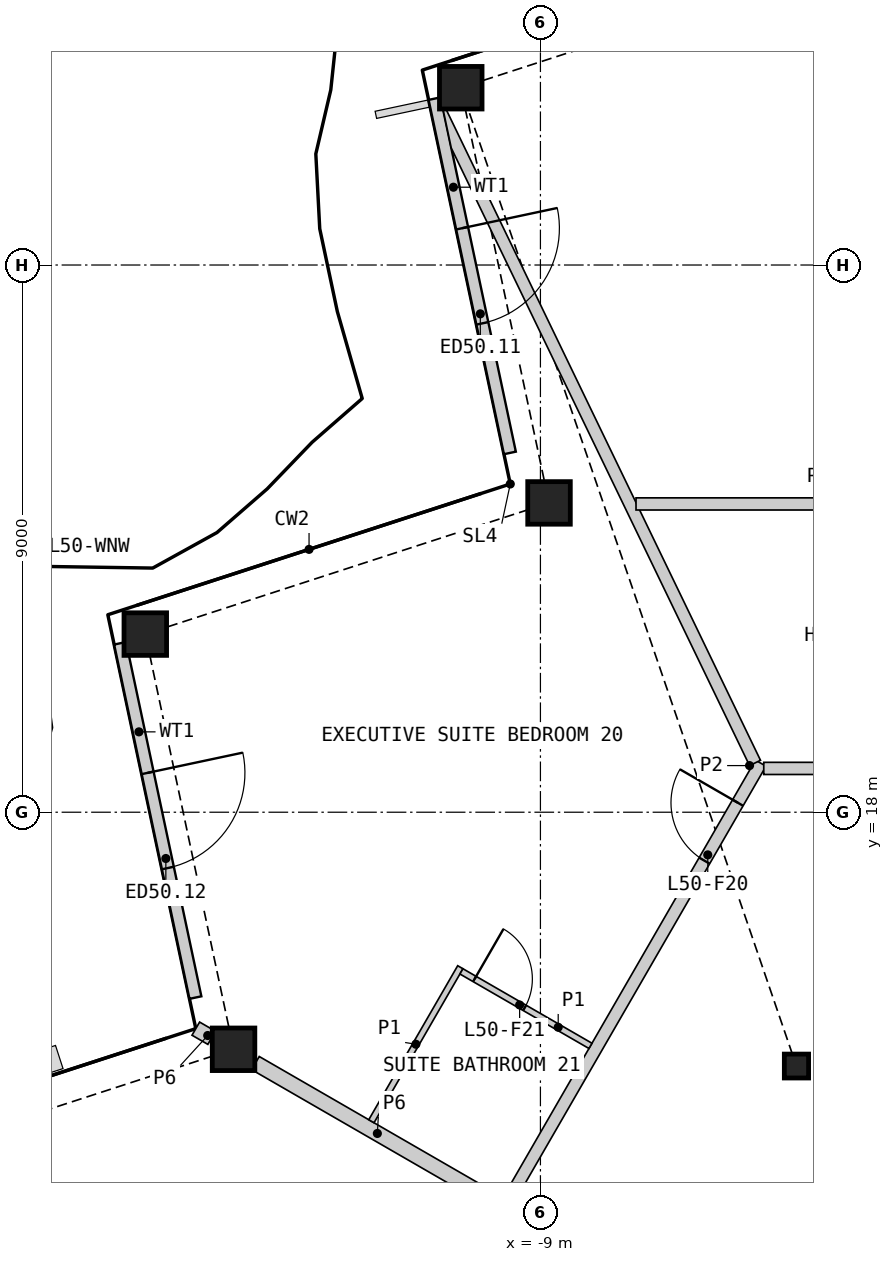
"""IFC4 building model, lengths in metres.
Left out: names, types, materials, properties, quantities, classifications, styles, units other than length and angle.
Written with IfcOpenShell. Run it as: python <this file> out.ifc"""

import sys

from ifc_helpers import new_model, si_unit, direction, frame, frame_2d, origin, origin_2d, place, context, subcontext, project, spatial, polyline, rectangle, hollow_rectangle, i_section, outline, extrude, element, fill, save


model = new_model("IFC4")
c1 = context("Model", 3, precision=1e-05, world=origin(), true_north=direction((0.0, 1.0)))
c2 = subcontext(c1, "Body", "Model", "MODEL_VIEW")
j1 = project(units=[si_unit("LENGTHUNIT", "METRE"), si_unit("PLANEANGLEUNIT", "RADIAN")], contexts=[c1])
p1 = place(None, origin())
s1 = spatial("IfcSite", under=j1, at=p1, CompositionType="ELEMENT")
p2 = place(p1, origin())
s2 = spatial("IfcBuilding", under=s1, at=p2, CompositionType="ELEMENT")
p3 = place(p2, frame((0.0, 0.0, 231.0)))
s3 = spatial("IfcBuildingStorey", under=s2, at=p3, CompositionType="ELEMENT", Elevation=231.0)
for number, where, z_axis, x_axis in (
    (1, (-10.31, 29.916, 0.0), (0.0, 0.0, 1.0), (1.0, 0.0, 0.0)),
    (2, (-8.859, 23.087, 0.0), (0.0, 0.0, 1.0), (1.0, 0.0, 0.0)),
    (3, (-15.499, 20.93, 0.0), (0.0, 0.0, 1.0), (1.0, 0.0, 0.0)),
    (4, (-14.047, 14.101, 0.0), (0.0, 0.0, 1.0), (1.0, 0.0, 0.0)),
):
    element("IfcColumn", number, at=place(p3, frame(where, z_axis=z_axis, x_axis=x_axis)), inside=s3, PredefinedType="COLUMN", context=c2, shape_type="SweptSolid", body=[
        extrude(hollow_rectangle(XDim=0.7, YDim=0.7, WallThickness=0.045, at=origin_2d()), origin(), (0.0, 0.0, 1.0), 3.6),
    ])
p4 = place(p3, frame((-4.789, 13.825, 0.0), z_axis=(0.0, 0.0, 1.0), x_axis=(1.0, 0.0, 0.0)))
e5 = element("IfcColumn", 5, at=p4, inside=s3, PredefinedType="COLUMN", context=c2, shape_type="SweptSolid", body=[
    extrude(i_section(OverallWidth=0.399, OverallDepth=0.393, WebThickness=0.023, FlangeThickness=0.037, at=origin_2d()), origin(), (0.0, 0.0, 1.0), 3.6),
])
p5 = place(p3, frame((-10.741, 29.737, 0.0), z_axis=(0.0, 0.0, 1.0), x_axis=(0.207891593624, -0.978151872308, 0.0)))
e6 = element("IfcWall", 6, at=p5, inside=s3, PredefinedType="SOLIDWALL", context=c2, shape_type="SweptSolid", body=[
    extrude(rectangle(XDim=5.958, YDim=0.2, at=frame_2d((2.979, 0.0))), origin(), (0.0, 0.0, 1.0), 2.701),
])
p6 = place(p5, frame((2.179, 0.0, 0.0)))
e7 = element("IfcOpeningElement", 7, at=p6, cuts=e6, PredefinedType="OPENING", context=c2, shape_type="SweptSolid", body=[
    extrude(rectangle(XDim=1.6, YDim=2.4, at=frame_2d((0.8, 1.2))), frame((0.0, 0.11, 0.0), z_axis=(0.0, -1.0, 0.0), x_axis=(1.0, 0.0, 0.0)), (0.0, 0.0, 1.0), 0.22),
])
p7 = place(p3, frame((-15.913, 20.779, 0.0), z_axis=(0.0, 0.0, 1.0), x_axis=(0.207930802022, -0.978143538327, 0.0)))
e8 = element("IfcWall", 8, at=p7, inside=s3, PredefinedType="SOLIDWALL", context=c2, shape_type="SweptSolid", body=[
    extrude(rectangle(XDim=5.958, YDim=0.2, at=frame_2d((2.979, 0.0))), origin(), (0.0, 0.0, 1.0), 2.701),
])
p8 = place(p7, frame((2.179, 0.0, 0.0)))
e9 = element("IfcOpeningElement", 9, at=p8, cuts=e8, PredefinedType="OPENING", context=c2, shape_type="SweptSolid", body=[
    extrude(rectangle(XDim=1.6, YDim=2.4, at=frame_2d((0.8, 1.2))), frame((0.0, 0.11, 0.0), z_axis=(0.0, -1.0, 0.0), x_axis=(1.0, 0.0, 0.0)), (0.0, 0.0, 1.0), 0.22),
])
p9 = place(p3, frame((-18.976, -4.747, 0.0), z_axis=(0.0, 0.0, 1.0), x_axis=(0.499999852422, 0.866025488988, 0.0)))
e10 = element("IfcWall", 10, at=p9, inside=s3, PredefinedType="PARTITIONING", context=c2, shape_type="SweptSolid", body=[
    extrude(rectangle(XDim=27.198, YDim=0.2, at=frame_2d((13.599, 0.0))), origin(), (0.0, 0.0, 1.0), 3.25),
])
p10 = place(p9, frame((25.346, 0.0, 0.0)))
e11 = element("IfcOpeningElement", 11, at=p10, cuts=e10, PredefinedType="OPENING", context=c2, shape_type="SweptSolid", body=[
    extrude(rectangle(XDim=1.1, YDim=2.1, at=frame_2d((0.55, 1.05))), frame((0.0, 0.11, 0.0), z_axis=(0.0, -1.0, 0.0), x_axis=(1.0, 0.0, 0.0)), (0.0, 0.0, 1.0), 0.22),
])
p11 = place(p9, frame((16.713, 0.0, 0.0)))
e12 = element("IfcOpeningElement", 12, at=p11, cuts=e10, PredefinedType="OPENING", context=c2, shape_type="SweptSolid", body=[
    extrude(rectangle(XDim=1.1, YDim=2.1, at=frame_2d((0.55, 1.05))), frame((0.0, 0.11, 0.0), z_axis=(0.0, -1.0, 0.0), x_axis=(1.0, 0.0, 0.0)), (0.0, 0.0, 1.0), 0.22),
])
p12 = place(p9, frame((0.35, 0.0, 0.0)))
e13 = element("IfcOpeningElement", 13, at=p12, cuts=e10, PredefinedType="OPENING", context=c2, shape_type="SweptSolid", body=[
    extrude(rectangle(XDim=1.1, YDim=2.1, at=frame_2d((0.55, 1.05))), frame((0.0, 0.11, 0.0), z_axis=(0.0, -1.0, 0.0), x_axis=(1.0, 0.0, 0.0)), (0.0, 0.0, 1.0), 0.22),
])
p13 = place(p3, frame((-13.687, 13.874, 0.0), z_axis=(0.0, 0.0, 1.0), x_axis=(0.866034555462, -0.499984148495, 0.0)))
e14 = element("IfcWall", 14, at=p13, inside=s3, PredefinedType="PARTITIONING", context=c2, shape_type="SweptSolid", body=[
    extrude(rectangle(XDim=4.63, YDim=0.25, at=frame_2d((2.315, 0.0))), origin(), (0.0, 0.0, 1.0), 2.404),
])
p14 = place(p3, frame((-5.327, 18.72, 0.0), z_axis=(0.0, 0.0, 1.0), x_axis=(1.0, 0.0, 0.0)))
e15 = element("IfcWall", 15, at=p14, inside=s3, PredefinedType="PARTITIONING", context=c2, shape_type="SweptSolid", body=[
    extrude(rectangle(XDim=3.002, YDim=0.2, at=frame_2d((1.501, 0.0))), origin(), (0.0, 0.0, 1.0), 3.25),
])
p15 = place(p3, frame((-14.668, 14.44, 0.0), z_axis=(0.0, 0.0, 1.0), x_axis=(0.865888485494, -0.500237074485, 0.0)))
e16 = element("IfcWall", 16, at=p15, inside=s3, PredefinedType="PARTITIONING", context=c2, shape_type="SweptSolid", body=[
    extrude(rectangle(XDim=0.301, YDim=0.25, at=frame_2d((0.15, 0.0))), origin(), (0.0, 0.0, 1.0), 2.404),
])
p16 = place(p3, origin())
e17 = element("IfcWall", 17, at=p16, inside=s3, PredefinedType="PARTITIONING", context=c2, shape_type="SweptSolid", body=[
    extrude(outline(polyline([(-5.561, 18.767), (-10.466, 28.923), (-10.64, 29.745), (-5.381, 18.854), (-5.561, 18.767)])), origin(), (0.0, 0.0, 1.0), 2.404),
])
p17 = place(p3, frame((-7.428, 23.071, 0.0), z_axis=(0.0, 0.0, 1.0), x_axis=(1.0, 0.0, 0.0)))
e18 = element("IfcWall", 18, at=p17, inside=s3, PredefinedType="PARTITIONING", context=c2, shape_type="SweptSolid", body=[
    extrude(rectangle(XDim=12.002, YDim=0.2, at=frame_2d((6.001, 0.0))), origin(), (0.0, 0.0, 1.0), 2.404),
])
p18 = place(p17, frame((5.275, 0.0, 0.0)))
e19 = element("IfcOpeningElement", 19, at=p18, cuts=e18, PredefinedType="OPENING", context=c2, shape_type="SweptSolid", body=[
    extrude(rectangle(XDim=0.95, YDim=2.1, at=frame_2d((0.475, 1.05))), frame((0.0, 0.11, 0.0), z_axis=(0.0, -1.0, 0.0), x_axis=(1.0, 0.0, 0.0)), (0.0, 0.0, 1.0), 0.22),
])
p19 = place(p3, frame((-11.78, 12.917, 0.0), z_axis=(0.0, 0.0, 1.0), x_axis=(0.499999433879, 0.866025730634, 0.0)))
e20 = element("IfcWall", 20, at=p19, inside=s3, PredefinedType="PARTITIONING", context=c2, shape_type="SweptSolid", body=[
    extrude(rectangle(XDim=2.925, YDim=0.1, at=frame_2d((1.462, 0.0))), origin(), (0.0, 0.0, 1.0), 2.404),
])
p20 = place(p3, frame((-10.299, 15.382, 0.0), z_axis=(0.0, 0.0, 1.0), x_axis=(0.866057815567, -0.499943856944, 0.0)))
e21 = element("IfcWall", 21, at=p20, inside=s3, PredefinedType="PARTITIONING", context=c2, shape_type="SweptSolid", body=[
    extrude(rectangle(XDim=2.45, YDim=0.1, at=frame_2d((1.225, 0.0))), origin(), (0.0, 0.0, 1.0), 2.404),
])
p21 = place(p20, frame((0.25, 0.0, 0.0)))
e22 = element("IfcOpeningElement", 22, at=p21, cuts=e21, PredefinedType="OPENING", context=c2, shape_type="SweptSolid", body=[
    extrude(rectangle(XDim=0.95, YDim=2.1, at=frame_2d((0.475, 1.05))), frame((0.0, 0.06, 0.0), z_axis=(0.0, -1.0, 0.0), x_axis=(1.0, 0.0, 0.0)), (0.0, 0.0, 1.0), 0.12),
])
p22 = place(p6, origin())
e23 = element("IfcDoor", 23, at=p22, inside=s3, OperationType="DOUBLE_DOOR_SINGLE_SWING", PredefinedType="DOOR", context=c2, shape_type="SweptSolid", body=[
    extrude(rectangle(XDim=1.6, YDim=2.4, at=frame_2d((0.8, 1.2))), frame((0.0, 0.025, 0.0), z_axis=(0.0, -1.0, 0.0), x_axis=(1.0, 0.0, 0.0)), (0.0, 0.0, 1.0), 0.05),
])
fill(e7, e23)
p23 = place(p8, origin())
e24 = element("IfcDoor", 24, at=p23, inside=s3, OperationType="DOUBLE_DOOR_SINGLE_SWING", PredefinedType="DOOR", context=c2, shape_type="SweptSolid", body=[
    extrude(rectangle(XDim=1.6, YDim=2.4, at=frame_2d((0.8, 1.2))), frame((0.0, 0.025, 0.0), z_axis=(0.0, -1.0, 0.0), x_axis=(1.0, 0.0, 0.0)), (0.0, 0.0, 1.0), 0.05),
])
fill(e9, e24)
p24 = place(p10, origin())
e25 = element("IfcDoor", 25, at=p24, inside=s3, OperationType="SINGLE_SWING_RIGHT", PredefinedType="DOOR", context=c2, shape_type="SweptSolid", body=[
    extrude(rectangle(XDim=1.1, YDim=2.1, at=frame_2d((0.55, 1.05))), frame((0.0, 0.025, 0.0), z_axis=(0.0, -1.0, 0.0), x_axis=(1.0, 0.0, 0.0)), (0.0, 0.0, 1.0), 0.05),
])
fill(e11, e25)
p25 = place(p21, origin())
e26 = element("IfcDoor", 26, at=p25, inside=s3, OperationType="SINGLE_SWING_LEFT", PredefinedType="DOOR", context=c2, shape_type="SweptSolid", body=[
    extrude(rectangle(XDim=0.95, YDim=2.1, at=frame_2d((0.475, 1.05))), frame((0.0, 0.025, 0.0), z_axis=(0.0, -1.0, 0.0), x_axis=(1.0, 0.0, 0.0)), (0.0, 0.0, 1.0), 0.05),
])
fill(e22, e26)
save(model, sys.argv[1])
